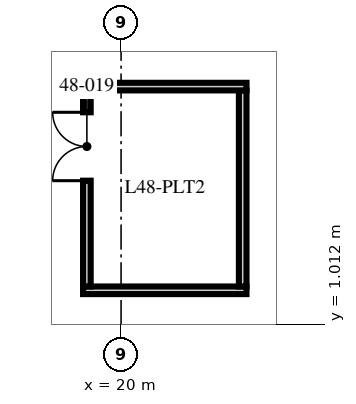
"""IFC4 building model, lengths in metres.
Left out: names, types, materials, properties, quantities, classifications, styles, units other than length and angle.
Written with IfcOpenShell. Run it as: python <this file> out.ifc"""

import sys

from ifc_helpers import new_model, si_unit, direction, frame, frame_2d, origin, origin_2d, place, context, subcontext, project, spatial, rectangle, hollow_rectangle, extrude, element, fill, save


model = new_model("IFC4")
c1 = context("Model", 3, precision=1e-05, world=origin(), true_north=direction((0.0, 1.0)))
c2 = subcontext(c1, "Body", "Model", "MODEL_VIEW")
j1 = project(units=[si_unit("LENGTHUNIT", "METRE"), si_unit("PLANEANGLEUNIT", "RADIAN")], contexts=[c1])
p1 = place(None, origin())
s1 = spatial("IfcSite", under=j1, at=p1, CompositionType="ELEMENT")
p2 = place(p1, origin())
s2 = spatial("IfcBuilding", under=s1, at=p2, CompositionType="ELEMENT")
p3 = place(p2, frame((0.0, 0.0, 192.0)))
s3 = spatial("IfcBuildingStorey", under=s2, at=p3, CompositionType="ELEMENT", Elevation=192.0)
p4 = place(p3, frame((27.1, 9.16, -0.65), z_axis=(-0.332991803119, -0.103570687408, 0.937224397765), x_axis=(-0.034607128924, 0.994622092871, 0.097617821118)))
e1 = element("IfcColumn", 1, at=p4, inside=s3, PredefinedType="COLUMN", context=c2, shape_type="SweptSolid", body=[
    extrude(hollow_rectangle(XDim=3.2, YDim=1.8, WallThickness=0.2, at=origin_2d()), origin(), (0.0, 0.0, 1.0), 8.109),
])
p5 = place(p3, frame((27.1, 0.0, -0.65), z_axis=(-0.334792284074, 0.0, 0.942291953974), x_axis=(0.0, 1.0, 0.0)))
e2 = element("IfcColumn", 2, at=p5, inside=s3, PredefinedType="COLUMN", context=c2, shape_type="SweptSolid", body=[
    extrude(hollow_rectangle(XDim=3.2, YDim=1.8, WallThickness=0.2, at=origin_2d()), origin(), (0.0, 0.0, 1.0), 8.065),
])
p6 = place(p3, frame((19.0, 1.9, 0.0), z_axis=(0.0, 0.0, 1.0), x_axis=(1.0, 0.0, 0.0)))
e3 = element("IfcWall", 3, at=p6, inside=s3, PredefinedType="SOLIDWALL", context=c2, shape_type="SweptSolid", body=[
    extrude(rectangle(XDim=4.3, YDim=0.2, at=frame_2d((2.15, 0.0))), origin(), (0.0, 0.0, 1.0), 7.25),
])
p7 = place(p3, frame((19.1, 2.0, 0.0), z_axis=(0.0, 0.0, 1.0), x_axis=(0.0, 1.0, 0.0)))
e4 = element("IfcWall", 4, at=p7, inside=s3, PredefinedType="SOLIDWALL", context=c2, shape_type="SweptSolid", body=[
    extrude(rectangle(XDim=5.16, YDim=0.2, at=frame_2d((2.58, 0.0))), origin(), (0.0, 0.0, 1.0), 6.56),
])
p8 = place(p7, frame((2.784, 0.0, 0.0)))
e5 = element("IfcOpeningElement", 5, at=p8, cuts=e4, PredefinedType="OPENING", context=c2, shape_type="SweptSolid", body=[
    extrude(rectangle(XDim=1.8, YDim=2.4, at=frame_2d((0.9, 1.2))), frame((0.0, 0.11, 0.0), z_axis=(0.0, -1.0, 0.0), x_axis=(1.0, 0.0, 0.0)), (0.0, 0.0, 1.0), 0.22),
])
p9 = place(p3, frame((23.2, 2.0, 0.0), z_axis=(0.0, 0.0, 1.0), x_axis=(0.0, 1.0, 0.0)))
e6 = element("IfcWall", 6, at=p9, inside=s3, PredefinedType="SOLIDWALL", context=c2, shape_type="SweptSolid", body=[
    extrude(rectangle(XDim=5.16, YDim=0.2, at=frame_2d((2.58, 0.0))), origin(), (0.0, 0.0, 1.0), 6.56),
])
p10 = place(p3, frame((19.0, 7.26, 0.0), z_axis=(0.0, 0.0, 1.0), x_axis=(1.0, 0.0, 0.0)))
e7 = element("IfcWall", 7, at=p10, inside=s3, PredefinedType="SOLIDWALL", context=c2, shape_type="SweptSolid", body=[
    extrude(rectangle(XDim=4.3, YDim=0.2, at=frame_2d((2.15, 0.0))), origin(), (0.0, 0.0, 1.0), 7.25),
])
p11 = place(p8, origin())
e8 = element("IfcDoor", 8, at=p11, inside=s3, OperationType="DOUBLE_DOOR_SINGLE_SWING", PredefinedType="DOOR", context=c2, shape_type="SweptSolid", body=[
    extrude(rectangle(XDim=1.8, YDim=2.4, at=frame_2d((0.9, 1.2))), frame((0.0, 0.025, 0.0), z_axis=(0.0, -1.0, 0.0), x_axis=(1.0, 0.0, 0.0)), (0.0, 0.0, 1.0), 0.05),
])
fill(e5, e8)
save(model, sys.argv[1])
